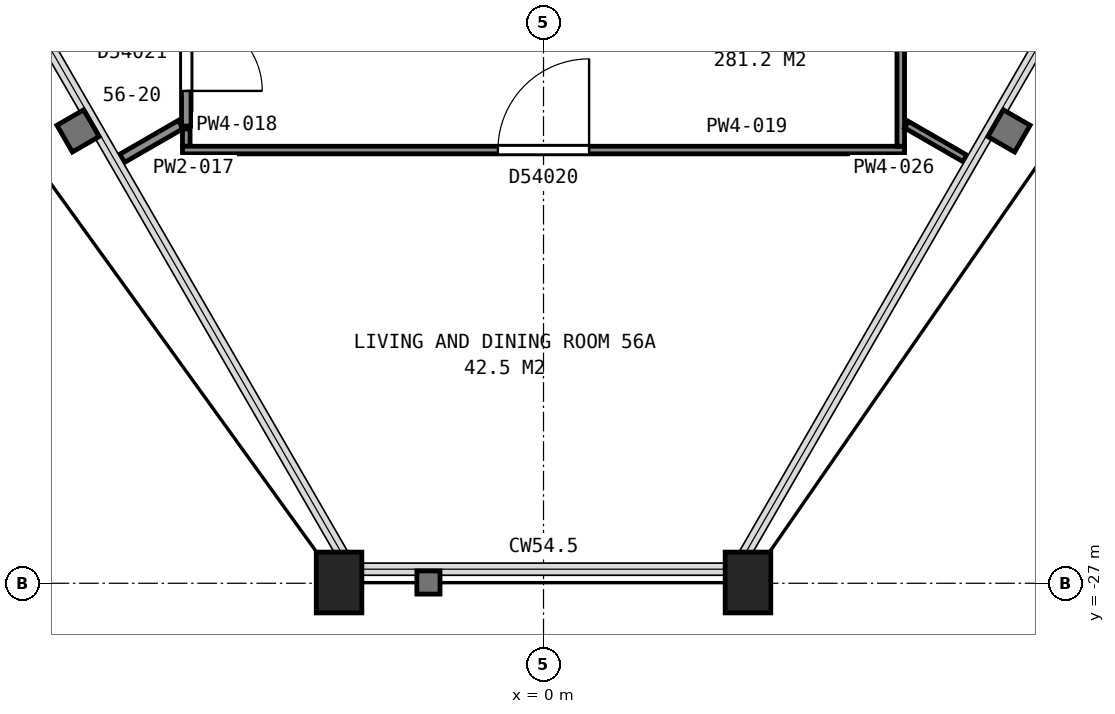
"""IFC4 building model, lengths in metres.
Left out: names, types, materials, properties, quantities, classifications, styles, units other than length and angle.
Written with IfcOpenShell. Run it as: python <this file> out.ifc"""

import sys

from ifc_helpers import new_model, si_unit, direction, frame, frame_2d, origin, origin_2d, place, context, subcontext, project, spatial, rectangle, hollow_rectangle, extrude, element, fill, save


model = new_model("IFC4")
c1 = context("Model", 3, precision=1e-05, world=origin(), true_north=direction((0.0, 1.0)))
c2 = subcontext(c1, "Body", "Model", "MODEL_VIEW")
j1 = project(units=[si_unit("LENGTHUNIT", "METRE"), si_unit("PLANEANGLEUNIT", "RADIAN")], contexts=[c1])
p1 = place(None, origin())
s1 = spatial("IfcSite", under=j1, at=p1, CompositionType="ELEMENT")
p2 = place(p1, origin())
s2 = spatial("IfcBuilding", under=s1, at=p2, CompositionType="ELEMENT")
p3 = place(p2, frame((0.0, 0.0, 224.9)))
s3 = spatial("IfcBuildingStorey", under=s2, at=p3, CompositionType="ELEMENT", Elevation=224.9)
for number, where, z_axis, x_axis in (
    (1, (-2.69, -26.99, 0.0), (0.0, 0.0, 1.0), (-1.0, 0.0, 0.0)),
    (2, (2.69, -26.99, 0.0), (0.0, 0.0, 1.0), (-1.0, 0.0, 0.0)),
):
    element("IfcColumn", number, at=place(p3, frame(where, z_axis=z_axis, x_axis=x_axis)), inside=s3, PredefinedType="COLUMN", context=c2, shape_type="SweptSolid", body=[
        extrude(hollow_rectangle(XDim=0.6, YDim=0.8, WallThickness=0.05, at=origin_2d()), origin(), (0.0, 0.0, 1.0), 3.7),
    ])
p4 = place(p3, frame((-5.544, -21.409, 0.0), z_axis=(0.0, 0.0, 1.0), x_axis=(0.866089597041, 0.499888797531, 0.0)))
e3 = element("IfcWall", 3, at=p4, inside=s3, PredefinedType="PARTITIONING", context=c2, shape_type="SweptSolid", body=[
    extrude(rectangle(XDim=0.889, YDim=0.125, at=frame_2d((0.445, 0.0))), origin(), (0.0, 0.0, 1.0), 2.713),
])
p5 = place(p3, frame((-4.7, -21.25, 0.0), z_axis=(0.0, 0.0, 1.0), x_axis=(0.0, 1.0, 0.0)))
e4 = element("IfcWall", 4, at=p5, inside=s3, PredefinedType="PARTITIONING", context=c2, shape_type="SweptSolid", body=[
    extrude(rectangle(XDim=0.228, YDim=0.1, at=frame_2d((0.114, 0.0))), origin(), (0.0, 0.0, 1.0), 2.713),
])
p6 = place(p3, frame((4.75, -21.3, 0.0), z_axis=(0.0, 0.0, 1.0), x_axis=(-1.0, 0.0, 0.0)))
e5 = element("IfcWall", 5, at=p6, inside=s3, PredefinedType="PARTITIONING", context=c2, shape_type="SweptSolid", body=[
    extrude(rectangle(XDim=9.5, YDim=0.1, at=frame_2d((4.75, 0.0))), origin(), (0.0, 0.0, 1.0), 2.713),
])
p7 = place(p6, frame((4.15, 0.0, 0.0)))
e6 = element("IfcOpeningElement", 6, at=p7, cuts=e5, PredefinedType="OPENING", context=c2, shape_type="SweptSolid", body=[
    extrude(rectangle(XDim=1.2, YDim=2.1, at=frame_2d((0.6, 1.05))), frame((0.0, 0.06, 0.0), z_axis=(0.0, -1.0, 0.0), x_axis=(1.0, 0.0, 0.0)), (0.0, 0.0, 1.0), 0.12),
])
p8 = place(p3, frame((-4.7, -18.846, 0.0), z_axis=(0.0, 0.0, 1.0), x_axis=(0.0, -1.0, 0.0)))
e7 = element("IfcWall", 7, at=p8, inside=s3, PredefinedType="PARTITIONING", context=c2, shape_type="SweptSolid", body=[
    extrude(rectangle(XDim=2.138, YDim=0.125, at=frame_2d((1.069, 0.0))), origin(), (0.0, 0.0, 1.0), 2.713),
])
p9 = place(p8, frame((0.676, 0.0, 0.0)))
e8 = element("IfcOpeningElement", 8, at=p9, cuts=e7, PredefinedType="OPENING", context=c2, shape_type="SweptSolid", body=[
    extrude(rectangle(XDim=1.0, YDim=2.1, at=frame_2d((0.5, 1.05))), frame((0.0, 0.073, 0.0), z_axis=(0.0, -1.0, 0.0), x_axis=(1.0, 0.0, 0.0)), (0.0, 0.0, 1.0), 0.145),
])
p10 = place(p3, frame((4.7, -21.25, 0.0), z_axis=(0.0, 0.0, 1.0), x_axis=(0.0, 1.0, 0.0)))
e9 = element("IfcWall", 9, at=p10, inside=s3, PredefinedType="PARTITIONING", context=c2, shape_type="SweptSolid", body=[
    extrude(rectangle(XDim=8.517, YDim=0.1, at=frame_2d((4.259, 0.0))), origin(), (0.0, 0.0, 1.0), 2.713),
])
p11 = place(p3, frame((4.775, -20.965, 0.0), z_axis=(0.0, 0.0, 1.0), x_axis=(0.866103179807, -0.499865263774, 0.0)))
e10 = element("IfcWall", 10, at=p11, inside=s3, PredefinedType="PARTITIONING", context=c2, shape_type="SweptSolid", body=[
    extrude(rectangle(XDim=0.888, YDim=0.1, at=frame_2d((0.444, 0.0))), origin(), (0.0, 0.0, 1.0), 2.713),
])
p12 = place(p7, origin())
e11 = element("IfcDoor", 11, at=p12, inside=s3, OperationType="SINGLE_SWING_LEFT", PredefinedType="DOOR", context=c2, shape_type="SweptSolid", body=[
    extrude(rectangle(XDim=1.2, YDim=2.1, at=frame_2d((0.6, 1.05))), frame((0.0, 0.025, 0.0), z_axis=(0.0, -1.0, 0.0), x_axis=(1.0, 0.0, 0.0)), (0.0, 0.0, 1.0), 0.05),
])
fill(e6, e11)
p13 = place(p9, origin())
e12 = element("IfcDoor", 12, at=p13, inside=s3, OperationType="SINGLE_SWING_RIGHT", PredefinedType="DOOR", context=c2, shape_type="SweptSolid", body=[
    extrude(rectangle(XDim=1.0, YDim=2.1, at=frame_2d((0.5, 1.05))), frame((0.0, 0.025, 0.0), z_axis=(0.0, -1.0, 0.0), x_axis=(1.0, 0.0, 0.0)), (0.0, 0.0, 1.0), 0.05),
])
fill(e8, e12)
save(model, sys.argv[1])
